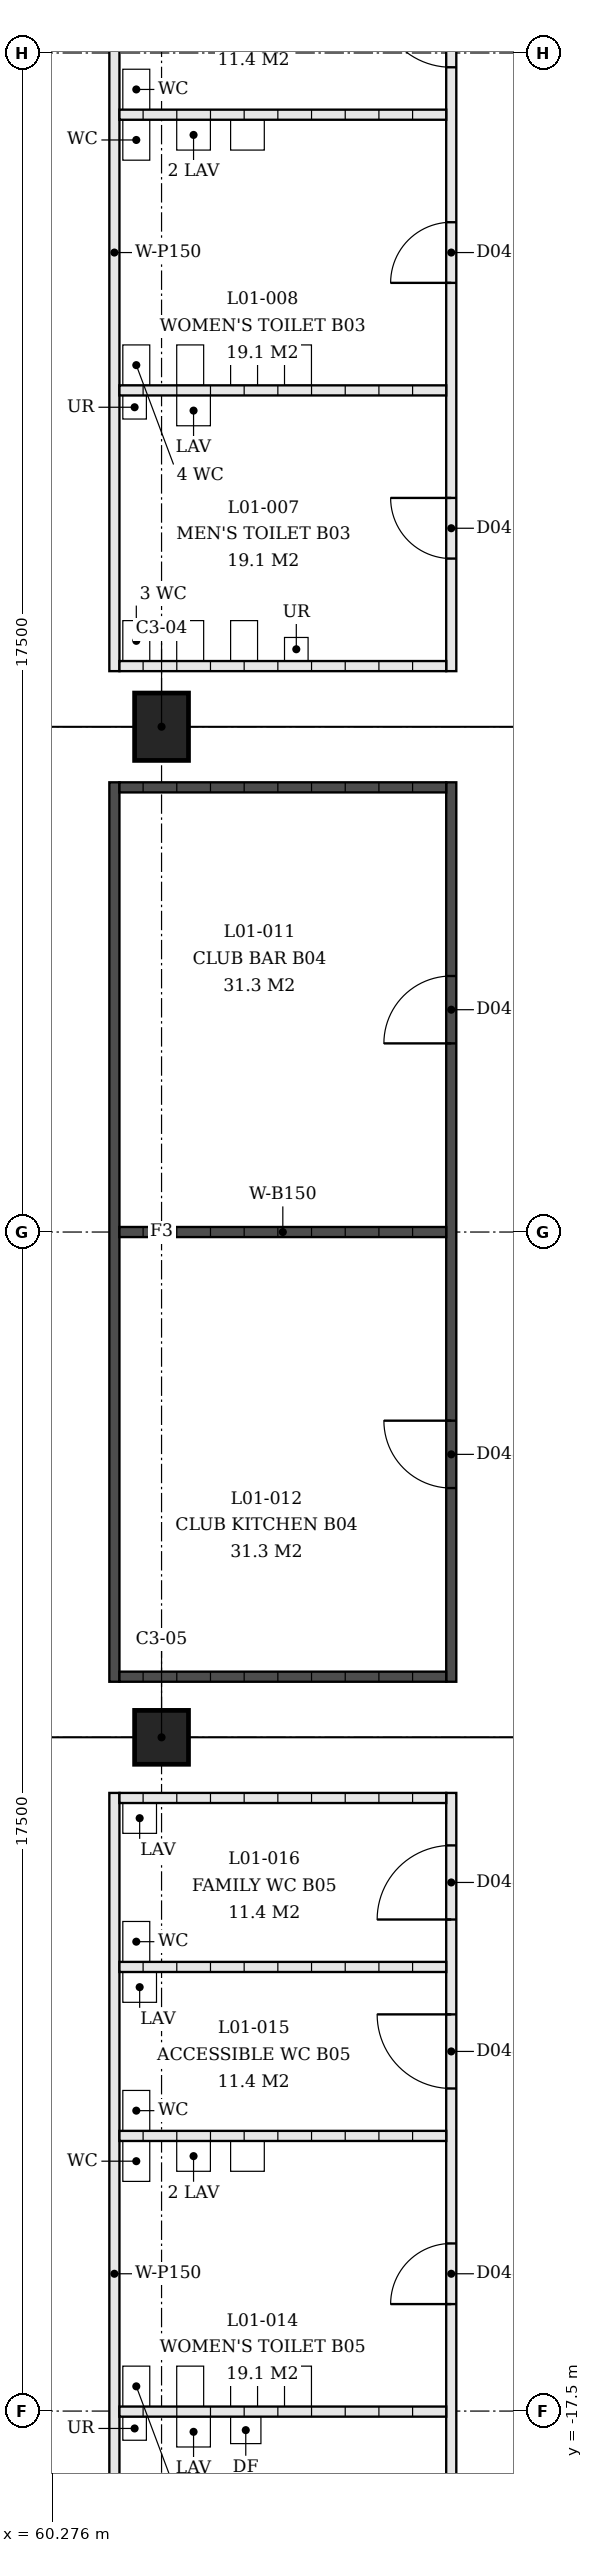
"""IFC4 building model, lengths in metres.
Left out: names, types, materials, properties, quantities, classifications, styles, units other than length and angle.
Written with IfcOpenShell. Run it as: python <this file> out.ifc"""

import sys

from ifc_helpers import new_model, si_unit, direction, frame, frame_2d, origin, origin_2d, place, context, subcontext, project, spatial, rectangle, extrude, element, fill, save


model = new_model("IFC4")
c1 = context("Model", 3, precision=1e-05, world=origin(), true_north=direction((0.0, 1.0)))
c2 = subcontext(c1, "Body", "Model", "MODEL_VIEW")
j1 = project(units=[si_unit("LENGTHUNIT", "METRE"), si_unit("PLANEANGLEUNIT", "RADIAN")], contexts=[c1])
p1 = place(None, origin())
s1 = spatial("IfcSite", under=j1, at=p1, CompositionType="ELEMENT")
p2 = place(p1, origin())
s2 = spatial("IfcBuilding", under=s1, at=p2, CompositionType="ELEMENT")
p3 = place(p2, frame((0.0, 0.0, 4.5)))
s3 = spatial("IfcBuildingStorey", under=s2, at=p3, CompositionType="ELEMENT", Elevation=4.5)
p4 = place(p3, frame((61.9, 7.5, 0.0), z_axis=(0.0, 0.0, 1.0), x_axis=(0.0, 1.0, 0.0)))
e1 = element("IfcColumn", 1, at=p4, inside=s3, PredefinedType="COLUMN", context=c2, shape_type="SweptSolid", body=[
    extrude(rectangle(XDim=1.0, YDim=0.8, at=origin_2d()), origin(), (0.0, 0.0, 1.0), 4.5),
])
p5 = place(p3, frame((61.9, -7.5, 0.0), z_axis=(0.0, 0.0, 1.0), x_axis=(0.0, 1.0, 0.0)))
e2 = element("IfcColumn", 2, at=p5, inside=s3, PredefinedType="COLUMN", context=c2, shape_type="SweptSolid", body=[
    extrude(rectangle(XDim=0.8, YDim=0.8, at=origin_2d()), origin(), (0.0, 0.0, 1.0), 4.5),
])
p6 = place(p3, frame((61.2, 8.325, 0.0), z_axis=(0.0, 0.0, 1.0), x_axis=(0.0, 1.0, 0.0)))
e3 = element("IfcWall", 3, at=p6, inside=s3, PredefinedType="PARTITIONING", context=c2, shape_type="SweptSolid", body=[
    extrude(rectangle(XDim=13.35, YDim=0.15, at=frame_2d((6.675, 0.0))), origin(), (0.0, 0.0, 1.0), 3.0),
])
p7 = place(p3, frame((66.2, 8.325, 0.0), z_axis=(0.0, 0.0, 1.0), x_axis=(0.0, 1.0, 0.0)))
e4 = element("IfcWall", 4, at=p7, inside=s3, PredefinedType="PARTITIONING", context=c2, shape_type="SweptSolid", body=[
    extrude(rectangle(XDim=13.35, YDim=0.15, at=frame_2d((6.675, 0.0))), origin(), (0.0, 0.0, 1.0), 3.0),
])
p8 = place(p7, frame((1.671, 0.0, 0.0)))
e5 = element("IfcOpeningElement", 5, at=p8, cuts=e4, PredefinedType="OPENING", context=c2, shape_type="SweptSolid", body=[
    extrude(rectangle(XDim=0.9, YDim=2.1, at=frame_2d((0.45, 1.05))), frame((0.0, 0.075, 0.0), z_axis=(0.0, -1.0, 0.0), x_axis=(1.0, 0.0, 0.0)), (0.0, 0.0, 1.0), 0.15),
])
p9 = place(p7, frame((5.763, 0.0, 0.0)))
e6 = element("IfcOpeningElement", 6, at=p9, cuts=e4, PredefinedType="OPENING", context=c2, shape_type="SweptSolid", body=[
    extrude(rectangle(XDim=0.9, YDim=2.1, at=frame_2d((0.45, 1.05))), frame((0.0, 0.075, 0.0), z_axis=(0.0, -1.0, 0.0), x_axis=(1.0, 0.0, 0.0)), (0.0, 0.0, 1.0), 0.15),
])
p10 = place(p7, frame((8.963, 0.0, 0.0)))
e7 = element("IfcOpeningElement", 7, at=p10, cuts=e4, PredefinedType="OPENING", context=c2, shape_type="SweptSolid", body=[
    extrude(rectangle(XDim=1.1, YDim=2.1, at=frame_2d((0.55, 1.05))), frame((0.0, 0.075, 0.0), z_axis=(0.0, -1.0, 0.0), x_axis=(1.0, 0.0, 0.0)), (0.0, 0.0, 1.0), 0.15),
])
p11 = place(p7, frame((11.471, 0.0, 0.0)))
e8 = element("IfcOpeningElement", 8, at=p11, cuts=e4, PredefinedType="OPENING", context=c2, shape_type="SweptSolid", body=[
    extrude(rectangle(XDim=1.1, YDim=2.1, at=frame_2d((0.55, 1.05))), frame((0.0, 0.075, 0.0), z_axis=(0.0, -1.0, 0.0), x_axis=(1.0, 0.0, 0.0)), (0.0, 0.0, 1.0), 0.15),
])
for number, where, z_axis, x_axis in (
    (9, (61.275, 8.4, 0.0), (0.0, 0.0, 1.0), (1.0, 0.0, 0.0)),
    (10, (61.275, 12.492, 0.0), (0.0, 0.0, 1.0), (1.0, 0.0, 0.0)),
    (11, (61.275, 16.584, 0.0), (0.0, 0.0, 1.0), (1.0, 0.0, 0.0)),
):
    element("IfcWall", number, at=place(p3, frame(where, z_axis=z_axis, x_axis=x_axis)), inside=s3, PredefinedType="PARTITIONING", context=c2, shape_type="SweptSolid", body=[
        extrude(rectangle(XDim=4.85, YDim=0.15, at=frame_2d((2.425, 0.0))), origin(), (0.0, 0.0, 1.0), 3.0),
    ])
p12 = place(p3, frame((61.2, 6.675, 0.0), z_axis=(0.0, 0.0, 1.0), x_axis=(0.0, -1.0, 0.0)))
e12 = element("IfcWall", 12, at=p12, inside=s3, PredefinedType="SOLIDWALL", context=c2, shape_type="SweptSolid", body=[
    extrude(rectangle(XDim=13.35, YDim=0.15, at=frame_2d((6.675, 0.0))), origin(), (0.0, 0.0, 1.0), 3.0),
])
p13 = place(p3, frame((66.2, 6.675, 0.0), z_axis=(0.0, 0.0, 1.0), x_axis=(0.0, -1.0, 0.0)))
e13 = element("IfcWall", 13, at=p13, inside=s3, PredefinedType="SOLIDWALL", context=c2, shape_type="SweptSolid", body=[
    extrude(rectangle(XDim=13.35, YDim=0.15, at=frame_2d((6.675, 0.0))), origin(), (0.0, 0.0, 1.0), 3.0),
])
p14 = place(p13, frame((2.875, 0.0, 0.0)))
e14 = element("IfcOpeningElement", 14, at=p14, cuts=e13, PredefinedType="OPENING", context=c2, shape_type="SweptSolid", body=[
    extrude(rectangle(XDim=1.0, YDim=2.1, at=frame_2d((0.5, 1.05))), frame((0.0, 0.075, 0.0), z_axis=(0.0, -1.0, 0.0), x_axis=(1.0, 0.0, 0.0)), (0.0, 0.0, 1.0), 0.15),
])
p15 = place(p13, frame((9.475, 0.0, 0.0)))
e15 = element("IfcOpeningElement", 15, at=p15, cuts=e13, PredefinedType="OPENING", context=c2, shape_type="SweptSolid", body=[
    extrude(rectangle(XDim=1.0, YDim=2.1, at=frame_2d((0.5, 1.05))), frame((0.0, 0.075, 0.0), z_axis=(0.0, -1.0, 0.0), x_axis=(1.0, 0.0, 0.0)), (0.0, 0.0, 1.0), 0.15),
])
for number, where, z_axis, x_axis in (
    (16, (61.275, 6.6, 0.0), (0.0, 0.0, 1.0), (1.0, 0.0, 0.0)),
    (17, (61.275, 0.0, 0.0), (0.0, 0.0, 1.0), (1.0, 0.0, 0.0)),
    (18, (61.275, -6.6, 0.0), (0.0, 0.0, 1.0), (1.0, 0.0, 0.0)),
):
    element("IfcWall", number, at=place(p3, frame(where, z_axis=z_axis, x_axis=x_axis)), inside=s3, PredefinedType="SOLIDWALL", context=c2, shape_type="SweptSolid", body=[
        extrude(rectangle(XDim=4.85, YDim=0.15, at=frame_2d((2.425, 0.0))), origin(), (0.0, 0.0, 1.0), 3.0),
    ])
p16 = place(p3, frame((61.2, -21.675, 0.0), z_axis=(0.0, 0.0, 1.0), x_axis=(0.0, 1.0, 0.0)))
e19 = element("IfcWall", 19, at=p16, inside=s3, PredefinedType="PARTITIONING", context=c2, shape_type="SweptSolid", body=[
    extrude(rectangle(XDim=13.35, YDim=0.15, at=frame_2d((6.675, 0.0))), origin(), (0.0, 0.0, 1.0), 3.0),
])
p17 = place(p3, frame((66.2, -21.675, 0.0), z_axis=(0.0, 0.0, 1.0), x_axis=(0.0, 1.0, 0.0)))
e20 = element("IfcWall", 20, at=p17, inside=s3, PredefinedType="PARTITIONING", context=c2, shape_type="SweptSolid", body=[
    extrude(rectangle(XDim=13.35, YDim=0.15, at=frame_2d((6.675, 0.0))), origin(), (0.0, 0.0, 1.0), 3.0),
])
p18 = place(p17, frame((1.671, 0.0, 0.0)))
e21 = element("IfcOpeningElement", 21, at=p18, cuts=e20, PredefinedType="OPENING", context=c2, shape_type="SweptSolid", body=[
    extrude(rectangle(XDim=0.9, YDim=2.1, at=frame_2d((0.45, 1.05))), frame((0.0, 0.075, 0.0), z_axis=(0.0, -1.0, 0.0), x_axis=(1.0, 0.0, 0.0)), (0.0, 0.0, 1.0), 0.15),
])
p19 = place(p17, frame((5.763, 0.0, 0.0)))
e22 = element("IfcOpeningElement", 22, at=p19, cuts=e20, PredefinedType="OPENING", context=c2, shape_type="SweptSolid", body=[
    extrude(rectangle(XDim=0.9, YDim=2.1, at=frame_2d((0.45, 1.05))), frame((0.0, 0.075, 0.0), z_axis=(0.0, -1.0, 0.0), x_axis=(1.0, 0.0, 0.0)), (0.0, 0.0, 1.0), 0.15),
])
p20 = place(p17, frame((8.963, 0.0, 0.0)))
e23 = element("IfcOpeningElement", 23, at=p20, cuts=e20, PredefinedType="OPENING", context=c2, shape_type="SweptSolid", body=[
    extrude(rectangle(XDim=1.1, YDim=2.1, at=frame_2d((0.55, 1.05))), frame((0.0, 0.075, 0.0), z_axis=(0.0, -1.0, 0.0), x_axis=(1.0, 0.0, 0.0)), (0.0, 0.0, 1.0), 0.15),
])
p21 = place(p17, frame((11.471, 0.0, 0.0)))
e24 = element("IfcOpeningElement", 24, at=p21, cuts=e20, PredefinedType="OPENING", context=c2, shape_type="SweptSolid", body=[
    extrude(rectangle(XDim=1.1, YDim=2.1, at=frame_2d((0.55, 1.05))), frame((0.0, 0.075, 0.0), z_axis=(0.0, -1.0, 0.0), x_axis=(1.0, 0.0, 0.0)), (0.0, 0.0, 1.0), 0.15),
])
for number, where, z_axis, x_axis in (
    (25, (61.275, -17.508, 0.0), (0.0, 0.0, 1.0), (1.0, 0.0, 0.0)),
    (26, (61.275, -13.416, 0.0), (0.0, 0.0, 1.0), (1.0, 0.0, 0.0)),
    (27, (61.275, -10.908, 0.0), (0.0, 0.0, 1.0), (1.0, 0.0, 0.0)),
    (28, (61.275, -8.4, 0.0), (0.0, 0.0, 1.0), (1.0, 0.0, 0.0)),
):
    element("IfcWall", number, at=place(p3, frame(where, z_axis=z_axis, x_axis=x_axis)), inside=s3, PredefinedType="PARTITIONING", context=c2, shape_type="SweptSolid", body=[
        extrude(rectangle(XDim=4.85, YDim=0.15, at=frame_2d((2.425, 0.0))), origin(), (0.0, 0.0, 1.0), 3.0),
    ])
p22 = place(p8, origin())
e29 = element("IfcDoor", 29, at=p22, inside=s3, OperationType="SINGLE_SWING_LEFT", PredefinedType="DOOR", context=c2, shape_type="SweptSolid", body=[
    extrude(rectangle(XDim=0.9, YDim=2.1, at=frame_2d((0.45, 1.05))), frame((0.0, 0.025, 0.0), z_axis=(0.0, -1.0, 0.0), x_axis=(1.0, 0.0, 0.0)), (0.0, 0.0, 1.0), 0.05),
])
fill(e5, e29)
p23 = place(p9, origin())
e30 = element("IfcDoor", 30, at=p23, inside=s3, OperationType="SINGLE_SWING_RIGHT", PredefinedType="DOOR", context=c2, shape_type="SweptSolid", body=[
    extrude(rectangle(XDim=0.9, YDim=2.1, at=frame_2d((0.45, 1.05))), frame((0.0, 0.025, 0.0), z_axis=(0.0, -1.0, 0.0), x_axis=(1.0, 0.0, 0.0)), (0.0, 0.0, 1.0), 0.05),
])
fill(e6, e30)
p24 = place(p10, origin())
e31 = element("IfcDoor", 31, at=p24, inside=s3, OperationType="SINGLE_SWING_LEFT", PredefinedType="DOOR", context=c2, shape_type="SweptSolid", body=[
    extrude(rectangle(XDim=1.1, YDim=2.1, at=frame_2d((0.55, 1.05))), frame((0.0, 0.025, 0.0), z_axis=(0.0, -1.0, 0.0), x_axis=(1.0, 0.0, 0.0)), (0.0, 0.0, 1.0), 0.05),
])
fill(e7, e31)
p25 = place(p14, origin())
e32 = element("IfcDoor", 32, at=p25, inside=s3, OperationType="SINGLE_SWING_RIGHT", PredefinedType="DOOR", context=c2, shape_type="SweptSolid", body=[
    extrude(rectangle(XDim=1.0, YDim=2.1, at=frame_2d((0.5, 1.05))), frame((0.0, 0.025, 0.0), z_axis=(0.0, -1.0, 0.0), x_axis=(1.0, 0.0, 0.0)), (0.0, 0.0, 1.0), 0.05),
])
fill(e14, e32)
p26 = place(p15, origin())
e33 = element("IfcDoor", 33, at=p26, inside=s3, OperationType="SINGLE_SWING_LEFT", PredefinedType="DOOR", context=c2, shape_type="SweptSolid", body=[
    extrude(rectangle(XDim=1.0, YDim=2.1, at=frame_2d((0.5, 1.05))), frame((0.0, 0.025, 0.0), z_axis=(0.0, -1.0, 0.0), x_axis=(1.0, 0.0, 0.0)), (0.0, 0.0, 1.0), 0.05),
])
fill(e15, e33)
p27 = place(p19, origin())
e34 = element("IfcDoor", 34, at=p27, inside=s3, OperationType="SINGLE_SWING_RIGHT", PredefinedType="DOOR", context=c2, shape_type="SweptSolid", body=[
    extrude(rectangle(XDim=0.9, YDim=2.1, at=frame_2d((0.45, 1.05))), frame((0.0, 0.025, 0.0), z_axis=(0.0, -1.0, 0.0), x_axis=(1.0, 0.0, 0.0)), (0.0, 0.0, 1.0), 0.05),
])
fill(e22, e34)
p28 = place(p20, origin())
e35 = element("IfcDoor", 35, at=p28, inside=s3, OperationType="SINGLE_SWING_LEFT", PredefinedType="DOOR", context=c2, shape_type="SweptSolid", body=[
    extrude(rectangle(XDim=1.1, YDim=2.1, at=frame_2d((0.55, 1.05))), frame((0.0, 0.025, 0.0), z_axis=(0.0, -1.0, 0.0), x_axis=(1.0, 0.0, 0.0)), (0.0, 0.0, 1.0), 0.05),
])
fill(e23, e35)
p29 = place(p21, origin())
e36 = element("IfcDoor", 36, at=p29, inside=s3, OperationType="SINGLE_SWING_RIGHT", PredefinedType="DOOR", context=c2, shape_type="SweptSolid", body=[
    extrude(rectangle(XDim=1.1, YDim=2.1, at=frame_2d((0.55, 1.05))), frame((0.0, 0.025, 0.0), z_axis=(0.0, -1.0, 0.0), x_axis=(1.0, 0.0, 0.0)), (0.0, 0.0, 1.0), 0.05),
])
fill(e24, e36)
save(model, sys.argv[1])
